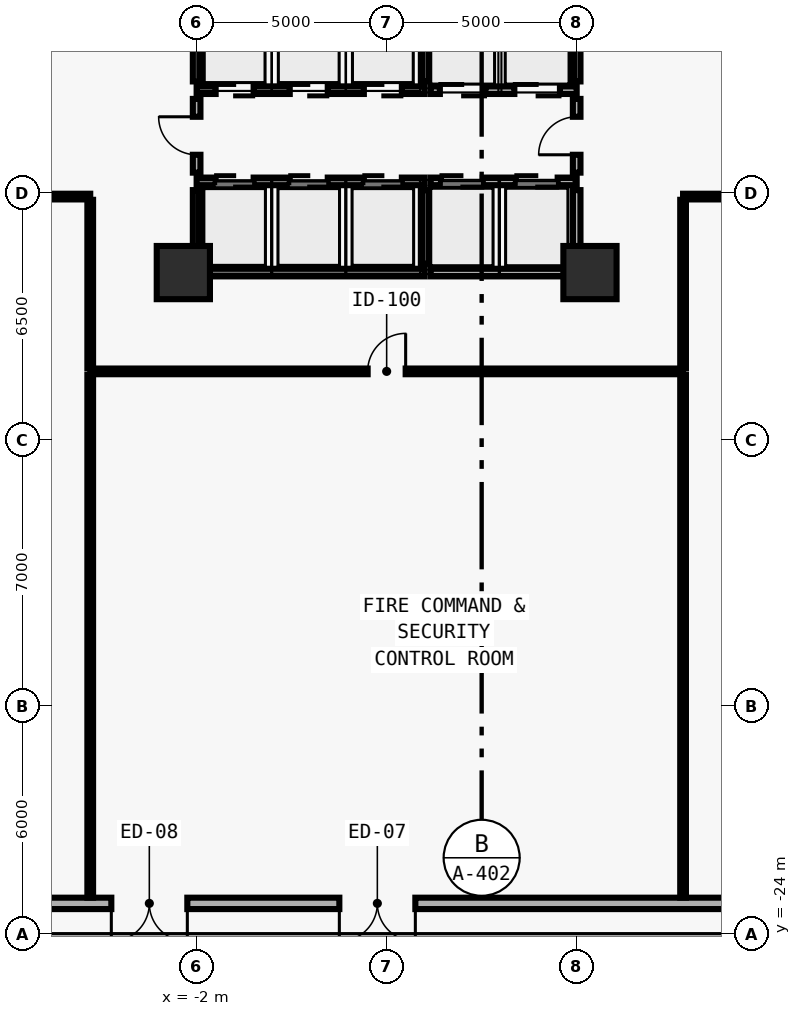
"""IFC4 building model, lengths in metres.
Left out: names, types, materials, properties, quantities, classifications, styles, units other than length and angle.
Written with IfcOpenShell. Run it as: python <this file> out.ifc"""

import sys

from ifc_helpers import new_model, si_unit, direction, frame, frame_2d, origin, origin_2d, place, context, subcontext, project, spatial, rectangle, extrude, element, fill, save


model = new_model("IFC4")
c1 = context("Model", 3, precision=1e-05, world=origin(), true_north=direction((0.0, 1.0)))
c2 = subcontext(c1, "Body", "Model", "MODEL_VIEW")
j1 = project(units=[si_unit("LENGTHUNIT", "METRE"), si_unit("PLANEANGLEUNIT", "RADIAN")], contexts=[c1])
p1 = place(None, origin())
s1 = spatial("IfcSite", under=j1, at=p1, CompositionType="ELEMENT")
p2 = place(p1, origin())
s2 = spatial("IfcBuilding", under=s1, at=p2, CompositionType="ELEMENT")
p3 = place(p2, origin())
s3 = spatial("IfcBuildingStorey", under=s2, at=p3, CompositionType="ELEMENT", Elevation=0.0)
for number, where, z_axis, x_axis in (
    (1, (-2.35, -6.6, 0.0), (0.0, 0.0, 1.0), (1.0, 0.0, 0.0)),
    (2, (8.35, -6.6, 0.0), (0.0, 0.0, 1.0), (1.0, 0.0, 0.0)),
):
    element("IfcColumn", number, at=place(p3, frame(where, z_axis=z_axis, x_axis=x_axis)), inside=s3, PredefinedType="COLUMN", context=c2, shape_type="SweptSolid", body=[
        extrude(rectangle(XDim=1.4, YDim=1.4, at=origin_2d()), origin(), (0.0, 0.0, 1.0), 4.575),
    ])
p4 = place(p3, frame((32.755, -23.2, 0.0), z_axis=(0.0, 0.0, 1.0), x_axis=(-1.0, 0.0, 0.0)))
e3 = element("IfcWall", 3, at=p4, inside=s3, PredefinedType="SOLIDWALL", context=c2, shape_type="SweptSolid", body=[
    extrude(rectangle(XDim=65.51, YDim=0.3, at=frame_2d((32.755, 0.0))), origin(), (0.0, 0.0, 1.0), 3.35),
])
p5 = place(p4, frame((29.0, 0.0, 0.0)))
e4 = element("IfcOpeningElement", 4, at=p5, cuts=e3, PredefinedType="OPENING", context=c2, shape_type="SweptSolid", body=[
    extrude(rectangle(XDim=2.0, YDim=2.4, at=frame_2d((1.0, 1.2))), frame((0.0, 0.16, 0.0), z_axis=(0.0, -1.0, 0.0), x_axis=(1.0, 0.0, 0.0)), (0.0, 0.0, 1.0), 0.32),
])
p6 = place(p4, frame((35.0, 0.0, 0.0)))
e5 = element("IfcOpeningElement", 5, at=p6, cuts=e3, PredefinedType="OPENING", context=c2, shape_type="SweptSolid", body=[
    extrude(rectangle(XDim=2.0, YDim=2.4, at=frame_2d((1.0, 1.2))), frame((0.0, 0.16, 0.0), z_axis=(0.0, -1.0, 0.0), x_axis=(1.0, 0.0, 0.0)), (0.0, 0.0, 1.0), 0.32),
])
p7 = place(p3, frame((-2.0, -1.8, 0.0), z_axis=(0.0, 0.0, 1.0), x_axis=(1.0, 0.0, 0.0)))
e6 = element("IfcWall", 6, at=p7, inside=s3, PredefinedType="SOLIDWALL", context=c2, shape_type="SweptSolid", body=[
    extrude(rectangle(XDim=6.0, YDim=0.2, at=frame_2d((3.0, 0.0))), origin(), (0.0, 0.0, 1.0), 4.28),
])
p8 = place(p7, frame((0.5, 0.0, 0.0)))
e7 = element("IfcOpeningElement", 7, at=p8, cuts=e6, PredefinedType="OPENING", context=c2, shape_type="SweptSolid", body=[
    extrude(rectangle(XDim=1.0, YDim=2.2, at=frame_2d((0.5, 1.1))), frame((0.0, 0.11, 0.0), z_axis=(0.0, -1.0, 0.0), x_axis=(1.0, 0.0, 0.0)), (0.0, 0.0, 1.0), 0.22),
])
p9 = place(p7, frame((2.45, 0.0, 0.0)))
e8 = element("IfcOpeningElement", 8, at=p9, cuts=e6, PredefinedType="OPENING", context=c2, shape_type="SweptSolid", body=[
    extrude(rectangle(XDim=1.0, YDim=2.2, at=frame_2d((0.5, 1.1))), frame((0.0, 0.11, 0.0), z_axis=(0.0, -1.0, 0.0), x_axis=(1.0, 0.0, 0.0)), (0.0, 0.0, 1.0), 0.22),
])
p10 = place(p7, frame((4.4, 0.0, 0.0)))
e9 = element("IfcOpeningElement", 9, at=p10, cuts=e6, PredefinedType="OPENING", context=c2, shape_type="SweptSolid", body=[
    extrude(rectangle(XDim=1.0, YDim=2.2, at=frame_2d((0.5, 1.1))), frame((0.0, 0.11, 0.0), z_axis=(0.0, -1.0, 0.0), x_axis=(1.0, 0.0, 0.0)), (0.0, 0.0, 1.0), 0.22),
])
p11 = place(p3, frame((-2.0, -1.57, 0.0), z_axis=(0.0, 0.0, 1.0), x_axis=(0.0, 1.0, 0.0)))
e10 = element("IfcWall", 10, at=p11, inside=s3, PredefinedType="SOLIDWALL", context=c2, shape_type="SweptSolid", body=[
    extrude(rectangle(XDim=2.05, YDim=0.2, at=frame_2d((1.025, 0.0))), origin(), (0.0, 0.0, 1.0), 3.362),
])
p12 = place(p3, frame((4.16, -1.8, 0.0), z_axis=(0.0, 0.0, 1.0), x_axis=(1.0, 0.0, 0.0)))
e11 = element("IfcWall", 11, at=p12, inside=s3, PredefinedType="SOLIDWALL", context=c2, shape_type="SweptSolid", body=[
    extrude(rectangle(XDim=3.84, YDim=0.2, at=frame_2d((1.92, 0.0))), origin(), (0.0, 0.0, 1.0), 4.28),
])
p13 = place(p12, frame((0.24, 0.0, 0.0)))
e12 = element("IfcOpeningElement", 12, at=p13, cuts=e11, PredefinedType="OPENING", context=c2, shape_type="SweptSolid", body=[
    extrude(rectangle(XDim=1.2, YDim=2.25, at=frame_2d((0.6, 1.125))), frame((0.0, 0.11, 0.0), z_axis=(0.0, -1.0, 0.0), x_axis=(1.0, 0.0, 0.0)), (0.0, 0.0, 1.0), 0.22),
])
p14 = place(p12, frame((2.2, 0.0, 0.0)))
e13 = element("IfcOpeningElement", 13, at=p14, cuts=e11, PredefinedType="OPENING", context=c2, shape_type="SweptSolid", body=[
    extrude(rectangle(XDim=1.2, YDim=2.25, at=frame_2d((0.6, 1.125))), frame((0.0, 0.11, 0.0), z_axis=(0.0, -1.0, 0.0), x_axis=(1.0, 0.0, 0.0)), (0.0, 0.0, 1.0), 0.22),
])
p15 = place(p3, frame((4.0, -1.57, 0.0), z_axis=(0.0, 0.0, 1.0), x_axis=(0.0, 1.0, 0.0)))
e14 = element("IfcWall", 14, at=p15, inside=s3, PredefinedType="SOLIDWALL", context=c2, shape_type="SweptSolid", body=[
    extrude(rectangle(XDim=1.94, YDim=0.2, at=frame_2d((0.97, 0.0))), origin(), (0.0, 0.0, 1.0), 4.28),
])
p16 = place(p3, frame((8.0, -1.57, 0.0), z_axis=(0.0, 0.0, 1.0), x_axis=(0.0, 1.0, 0.0)))
e15 = element("IfcWall", 15, at=p16, inside=s3, PredefinedType="SOLIDWALL", context=c2, shape_type="SweptSolid", body=[
    extrude(rectangle(XDim=2.05, YDim=0.2, at=frame_2d((1.025, 0.0))), origin(), (0.0, 0.0, 1.0), 3.362),
])
p17 = place(p3, frame((-2.0, -4.2, 0.0), z_axis=(0.0, 0.0, 1.0), x_axis=(1.0, 0.0, 0.0)))
e16 = element("IfcWall", 16, at=p17, inside=s3, PredefinedType="SOLIDWALL", context=c2, shape_type="SweptSolid", body=[
    extrude(rectangle(XDim=6.0, YDim=0.2, at=frame_2d((3.0, 0.0))), origin(), (0.0, 0.0, 1.0), 4.28),
])
p18 = place(p17, frame((0.5, 0.0, 0.0)))
e17 = element("IfcOpeningElement", 17, at=p18, cuts=e16, PredefinedType="OPENING", context=c2, shape_type="SweptSolid", body=[
    extrude(rectangle(XDim=1.0, YDim=2.2, at=frame_2d((0.5, 1.1))), frame((0.0, 0.11, 0.0), z_axis=(0.0, -1.0, 0.0), x_axis=(1.0, 0.0, 0.0)), (0.0, 0.0, 1.0), 0.22),
])
p19 = place(p17, frame((2.45, 0.0, 0.0)))
e18 = element("IfcOpeningElement", 18, at=p19, cuts=e16, PredefinedType="OPENING", context=c2, shape_type="SweptSolid", body=[
    extrude(rectangle(XDim=1.0, YDim=2.2, at=frame_2d((0.5, 1.1))), frame((0.0, 0.11, 0.0), z_axis=(0.0, -1.0, 0.0), x_axis=(1.0, 0.0, 0.0)), (0.0, 0.0, 1.0), 0.22),
])
p20 = place(p17, frame((4.4, 0.0, 0.0)))
e19 = element("IfcOpeningElement", 19, at=p20, cuts=e16, PredefinedType="OPENING", context=c2, shape_type="SweptSolid", body=[
    extrude(rectangle(XDim=1.0, YDim=2.2, at=frame_2d((0.5, 1.1))), frame((0.0, 0.11, 0.0), z_axis=(0.0, -1.0, 0.0), x_axis=(1.0, 0.0, 0.0)), (0.0, 0.0, 1.0), 0.22),
])
p21 = place(p3, frame((-2.0, -6.6, 0.0), z_axis=(0.0, 0.0, 1.0), x_axis=(1.0, 0.0, 0.0)))
e20 = element("IfcWall", 20, at=p21, inside=s3, PredefinedType="SOLIDWALL", context=c2, shape_type="SweptSolid", body=[
    extrude(rectangle(XDim=6.0, YDim=0.2, at=frame_2d((3.0, 0.0))), origin(), (0.0, 0.0, 1.0), 3.362),
])
p22 = place(p3, frame((-2.0, -6.37, 0.0), z_axis=(0.0, 0.0, 1.0), x_axis=(0.0, 1.0, 0.0)))
e21 = element("IfcWall", 21, at=p22, inside=s3, PredefinedType="SOLIDWALL", context=c2, shape_type="SweptSolid", body=[
    extrude(rectangle(XDim=1.94, YDim=0.2, at=frame_2d((0.97, 0.0))), origin(), (0.0, 0.0, 1.0), 3.362),
])
p23 = place(p3, frame((4.16, -4.2, 0.0), z_axis=(0.0, 0.0, 1.0), x_axis=(1.0, 0.0, 0.0)))
e22 = element("IfcWall", 22, at=p23, inside=s3, PredefinedType="SOLIDWALL", context=c2, shape_type="SweptSolid", body=[
    extrude(rectangle(XDim=3.84, YDim=0.2, at=frame_2d((1.92, 0.0))), origin(), (0.0, 0.0, 1.0), 4.28),
])
p24 = place(p23, frame((0.27, 0.0, 0.0)))
e23 = element("IfcOpeningElement", 23, at=p24, cuts=e22, PredefinedType="OPENING", context=c2, shape_type="SweptSolid", body=[
    extrude(rectangle(XDim=1.1, YDim=2.2, at=frame_2d((0.55, 1.1))), frame((0.0, 0.11, 0.0), z_axis=(0.0, -1.0, 0.0), x_axis=(1.0, 0.0, 0.0)), (0.0, 0.0, 1.0), 0.22),
])
p25 = place(p23, frame((2.24, 0.0, 0.0)))
e24 = element("IfcOpeningElement", 24, at=p25, cuts=e22, PredefinedType="OPENING", context=c2, shape_type="SweptSolid", body=[
    extrude(rectangle(XDim=1.1, YDim=2.2, at=frame_2d((0.55, 1.1))), frame((0.0, 0.11, 0.0), z_axis=(0.0, -1.0, 0.0), x_axis=(1.0, 0.0, 0.0)), (0.0, 0.0, 1.0), 0.22),
])
p26 = place(p3, frame((4.16, -6.6, 0.0), z_axis=(0.0, 0.0, 1.0), x_axis=(1.0, 0.0, 0.0)))
e25 = element("IfcWall", 25, at=p26, inside=s3, PredefinedType="SOLIDWALL", context=c2, shape_type="SweptSolid", body=[
    extrude(rectangle(XDim=3.84, YDim=0.2, at=frame_2d((1.92, 0.0))), origin(), (0.0, 0.0, 1.0), 3.362),
])
p27 = place(p3, frame((4.0, -6.37, 0.0), z_axis=(0.0, 0.0, 1.0), x_axis=(0.0, 1.0, 0.0)))
e26 = element("IfcWall", 26, at=p27, inside=s3, PredefinedType="SOLIDWALL", context=c2, shape_type="SweptSolid", body=[
    extrude(rectangle(XDim=1.94, YDim=0.2, at=frame_2d((0.97, 0.0))), origin(), (0.0, 0.0, 1.0), 4.28),
])
p28 = place(p3, frame((8.0, -6.37, 0.0), z_axis=(0.0, 0.0, 1.0), x_axis=(0.0, 1.0, 0.0)))
e27 = element("IfcWall", 27, at=p28, inside=s3, PredefinedType="SOLIDWALL", context=c2, shape_type="SweptSolid", body=[
    extrude(rectangle(XDim=1.94, YDim=0.2, at=frame_2d((0.97, 0.0))), origin(), (0.0, 0.0, 1.0), 3.362),
])
p29 = place(p3, frame((-2.0, -3.97, 0.0), z_axis=(0.0, 0.0, 1.0), x_axis=(0.0, 1.0, 0.0)))
e28 = element("IfcWall", 28, at=p29, inside=s3, PredefinedType="MOVABLE", context=c2, shape_type="SweptSolid", body=[
    extrude(rectangle(XDim=1.94, YDim=0.2, at=frame_2d((0.97, 0.0))), origin(), (0.0, 0.0, 1.0), 3.362),
])
p30 = place(p29, frame((0.47, 0.0, 0.0)))
e29 = element("IfcOpeningElement", 29, at=p30, cuts=e28, PredefinedType="OPENING", context=c2, shape_type="SweptSolid", body=[
    extrude(rectangle(XDim=1.0, YDim=2.1, at=frame_2d((0.5, 1.05))), frame((0.0, 0.11, 0.0), z_axis=(0.0, -1.0, 0.0), x_axis=(1.0, 0.0, 0.0)), (0.0, 0.0, 1.0), 0.22),
])
p31 = place(p3, frame((8.0, -3.97, 0.0), z_axis=(0.0, 0.0, 1.0), x_axis=(0.0, 1.0, 0.0)))
e30 = element("IfcWall", 30, at=p31, inside=s3, PredefinedType="MOVABLE", context=c2, shape_type="SweptSolid", body=[
    extrude(rectangle(XDim=1.94, YDim=0.2, at=frame_2d((0.97, 0.0))), origin(), (0.0, 0.0, 1.0), 3.362),
])
p32 = place(p31, frame((0.47, 0.0, 0.0)))
e31 = element("IfcOpeningElement", 31, at=p32, cuts=e30, PredefinedType="OPENING", context=c2, shape_type="SweptSolid", body=[
    extrude(rectangle(XDim=1.0, YDim=2.1, at=frame_2d((0.5, 1.05))), frame((0.0, 0.11, 0.0), z_axis=(0.0, -1.0, 0.0), x_axis=(1.0, 0.0, 0.0)), (0.0, 0.0, 1.0), 0.22),
])
p33 = place(p3, frame((-15.7, -4.6, 0.0), z_axis=(0.0, 0.0, 1.0), x_axis=(1.0, 0.0, 0.0)))
e32 = element("IfcWall", 32, at=p33, inside=s3, PredefinedType="PARTITIONING", context=c2, shape_type="SweptSolid", body=[
    extrude(rectangle(XDim=10.9, YDim=0.15, at=frame_2d((5.45, 0.0))), origin(), (0.0, 0.0, 1.0), 4.28),
])
p34 = place(p33, frame((4.95, 0.0, 0.0)))
e33 = element("IfcOpeningElement", 33, at=p34, cuts=e32, PredefinedType="OPENING", context=c2, shape_type="SweptSolid", body=[
    extrude(rectangle(XDim=1.0, YDim=2.1, at=frame_2d((0.5, 1.05))), frame((0.0, 0.085, 0.0), z_axis=(0.0, -1.0, 0.0), x_axis=(1.0, 0.0, 0.0)), (0.0, 0.0, 1.0), 0.17),
])
p35 = place(p3, frame((10.8, -4.6, 0.0), z_axis=(0.0, 0.0, 1.0), x_axis=(1.0, 0.0, 0.0)))
e34 = element("IfcWall", 34, at=p35, inside=s3, PredefinedType="PARTITIONING", context=c2, shape_type="SweptSolid", body=[
    extrude(rectangle(XDim=22.25, YDim=0.15, at=frame_2d((11.125, 0.0))), origin(), (0.0, 0.0, 1.0), 4.28),
])
p36 = place(p35, frame((10.625, 0.0, 0.0)))
e35 = element("IfcOpeningElement", 35, at=p36, cuts=e34, PredefinedType="OPENING", context=c2, shape_type="SweptSolid", body=[
    extrude(rectangle(XDim=1.0, YDim=2.1, at=frame_2d((0.5, 1.05))), frame((0.0, 0.085, 0.0), z_axis=(0.0, -1.0, 0.0), x_axis=(1.0, 0.0, 0.0)), (0.0, 0.0, 1.0), 0.17),
])
p37 = place(p3, frame((-4.8, -9.2, 0.0), z_axis=(0.0, 0.0, 1.0), x_axis=(1.0, 0.0, 0.0)))
e36 = element("IfcWall", 36, at=p37, inside=s3, PredefinedType="PARTITIONING", context=c2, shape_type="SweptSolid", body=[
    extrude(rectangle(XDim=15.6, YDim=0.15, at=frame_2d((7.8, 0.0))), origin(), (0.0, 0.0, 1.0), 4.28),
])
p38 = place(p37, frame((7.3, 0.0, 0.0)))
e37 = element("IfcOpeningElement", 37, at=p38, cuts=e36, PredefinedType="OPENING", context=c2, shape_type="SweptSolid", body=[
    extrude(rectangle(XDim=1.0, YDim=2.1, at=frame_2d((0.5, 1.05))), frame((0.0, 0.085, 0.0), z_axis=(0.0, -1.0, 0.0), x_axis=(1.0, 0.0, 0.0)), (0.0, 0.0, 1.0), 0.17),
])
for number, where, z_axis, x_axis in (
    (38, (-4.8, -4.685, 0.0), (0.0, 0.0, 1.0), (0.0, -1.0, 0.0)),
    (39, (10.8, -9.115, 0.0), (0.0, 0.0, 1.0), (0.0, 1.0, 0.0)),
):
    element("IfcWall", number, at=place(p3, frame(where, z_axis=z_axis, x_axis=x_axis)), inside=s3, PredefinedType="PARTITIONING", context=c2, shape_type="SweptSolid", body=[
        extrude(rectangle(XDim=4.43, YDim=0.15, at=frame_2d((2.215, 0.0))), origin(), (0.0, 0.0, 1.0), 4.28),
    ])
for number, where, z_axis, x_axis in (
    (40, (-4.8, -9.285, 0.0), (0.0, 0.0, 1.0), (0.0, -1.0, 0.0)),
    (41, (10.8, -23.05, 0.0), (0.0, 0.0, 1.0), (0.0, 1.0, 0.0)),
):
    element("IfcWall", number, at=place(p3, frame(where, z_axis=z_axis, x_axis=x_axis)), inside=s3, PredefinedType="PARTITIONING", context=c2, shape_type="SweptSolid", body=[
        extrude(rectangle(XDim=13.765, YDim=0.15, at=frame_2d((6.883, 0.0))), origin(), (0.0, 0.0, 1.0), 4.28),
    ])
p39 = place(p5, origin())
e42 = element("IfcDoor", 42, at=p39, inside=s3, OperationType="DOUBLE_DOOR_SINGLE_SWING", PredefinedType="DOOR", context=c2, shape_type="SweptSolid", body=[
    extrude(rectangle(XDim=2.0, YDim=2.4, at=frame_2d((1.0, 1.2))), frame((0.0, 0.025, 0.0), z_axis=(0.0, -1.0, 0.0), x_axis=(1.0, 0.0, 0.0)), (0.0, 0.0, 1.0), 0.05),
])
fill(e4, e42)
p40 = place(p6, origin())
e43 = element("IfcDoor", 43, at=p40, inside=s3, OperationType="DOUBLE_DOOR_SINGLE_SWING", PredefinedType="DOOR", context=c2, shape_type="SweptSolid", body=[
    extrude(rectangle(XDim=2.0, YDim=2.4, at=frame_2d((1.0, 1.2))), frame((0.0, 0.025, 0.0), z_axis=(0.0, -1.0, 0.0), x_axis=(1.0, 0.0, 0.0)), (0.0, 0.0, 1.0), 0.05),
])
fill(e5, e43)
p41 = place(p30, origin())
e44 = element("IfcDoor", 44, at=p41, inside=s3, OperationType="SINGLE_SWING_RIGHT", PredefinedType="DOOR", context=c2, shape_type="SweptSolid", body=[
    extrude(rectangle(XDim=1.0, YDim=2.1, at=frame_2d((0.5, 1.05))), frame((0.0, 0.025, 0.0), z_axis=(0.0, -1.0, 0.0), x_axis=(1.0, 0.0, 0.0)), (0.0, 0.0, 1.0), 0.05),
])
fill(e29, e44)
p42 = place(p32, origin())
e45 = element("IfcDoor", 45, at=p42, inside=s3, OperationType="SINGLE_SWING_LEFT", PredefinedType="DOOR", context=c2, shape_type="SweptSolid", body=[
    extrude(rectangle(XDim=1.0, YDim=2.1, at=frame_2d((0.5, 1.05))), frame((0.0, 0.025, 0.0), z_axis=(0.0, -1.0, 0.0), x_axis=(1.0, 0.0, 0.0)), (0.0, 0.0, 1.0), 0.05),
])
fill(e31, e45)
p43 = place(p38, origin())
e46 = element("IfcDoor", 46, at=p43, inside=s3, OperationType="SINGLE_SWING_RIGHT", PredefinedType="DOOR", context=c2, shape_type="SweptSolid", body=[
    extrude(rectangle(XDim=1.0, YDim=2.1, at=frame_2d((0.5, 1.05))), frame((0.0, 0.025, 0.0), z_axis=(0.0, -1.0, 0.0), x_axis=(1.0, 0.0, 0.0)), (0.0, 0.0, 1.0), 0.05),
])
fill(e37, e46)
p44 = place(p8, origin())
e47 = element("IfcDoor", 47, at=p44, inside=s3, OperationType="DOUBLE_DOOR_SLIDING", PredefinedType="DOOR", context=c2, shape_type="SweptSolid", body=[
    extrude(rectangle(XDim=1.0, YDim=2.2, at=frame_2d((0.5, 1.1))), frame((0.0, 0.025, 0.0), z_axis=(0.0, -1.0, 0.0), x_axis=(1.0, 0.0, 0.0)), (0.0, 0.0, 1.0), 0.05),
])
fill(e7, e47)
p45 = place(p9, origin())
e48 = element("IfcDoor", 48, at=p45, inside=s3, OperationType="DOUBLE_DOOR_SLIDING", PredefinedType="DOOR", context=c2, shape_type="SweptSolid", body=[
    extrude(rectangle(XDim=1.0, YDim=2.2, at=frame_2d((0.5, 1.1))), frame((0.0, 0.025, 0.0), z_axis=(0.0, -1.0, 0.0), x_axis=(1.0, 0.0, 0.0)), (0.0, 0.0, 1.0), 0.05),
])
fill(e8, e48)
p46 = place(p10, origin())
e49 = element("IfcDoor", 49, at=p46, inside=s3, OperationType="DOUBLE_DOOR_SLIDING", PredefinedType="DOOR", context=c2, shape_type="SweptSolid", body=[
    extrude(rectangle(XDim=1.0, YDim=2.2, at=frame_2d((0.5, 1.1))), frame((0.0, 0.025, 0.0), z_axis=(0.0, -1.0, 0.0), x_axis=(1.0, 0.0, 0.0)), (0.0, 0.0, 1.0), 0.05),
])
fill(e9, e49)
p47 = place(p13, origin())
e50 = element("IfcDoor", 50, at=p47, inside=s3, OperationType="DOUBLE_DOOR_SLIDING", PredefinedType="DOOR", context=c2, shape_type="SweptSolid", body=[
    extrude(rectangle(XDim=1.2, YDim=2.25, at=frame_2d((0.6, 1.125))), frame((0.0, 0.025, 0.0), z_axis=(0.0, -1.0, 0.0), x_axis=(1.0, 0.0, 0.0)), (0.0, 0.0, 1.0), 0.05),
])
fill(e12, e50)
p48 = place(p14, origin())
e51 = element("IfcDoor", 51, at=p48, inside=s3, OperationType="DOUBLE_DOOR_SLIDING", PredefinedType="DOOR", context=c2, shape_type="SweptSolid", body=[
    extrude(rectangle(XDim=1.2, YDim=2.25, at=frame_2d((0.6, 1.125))), frame((0.0, 0.025, 0.0), z_axis=(0.0, -1.0, 0.0), x_axis=(1.0, 0.0, 0.0)), (0.0, 0.0, 1.0), 0.05),
])
fill(e13, e51)
p49 = place(p18, origin())
e52 = element("IfcDoor", 52, at=p49, inside=s3, OperationType="DOUBLE_DOOR_SLIDING", PredefinedType="DOOR", context=c2, shape_type="SweptSolid", body=[
    extrude(rectangle(XDim=1.0, YDim=2.2, at=frame_2d((0.5, 1.1))), frame((0.0, 0.025, 0.0), z_axis=(0.0, -1.0, 0.0), x_axis=(1.0, 0.0, 0.0)), (0.0, 0.0, 1.0), 0.05),
])
fill(e17, e52)
p50 = place(p19, origin())
e53 = element("IfcDoor", 53, at=p50, inside=s3, OperationType="DOUBLE_DOOR_SLIDING", PredefinedType="DOOR", context=c2, shape_type="SweptSolid", body=[
    extrude(rectangle(XDim=1.0, YDim=2.2, at=frame_2d((0.5, 1.1))), frame((0.0, 0.025, 0.0), z_axis=(0.0, -1.0, 0.0), x_axis=(1.0, 0.0, 0.0)), (0.0, 0.0, 1.0), 0.05),
])
fill(e18, e53)
p51 = place(p20, origin())
e54 = element("IfcDoor", 54, at=p51, inside=s3, OperationType="DOUBLE_DOOR_SLIDING", PredefinedType="DOOR", context=c2, shape_type="SweptSolid", body=[
    extrude(rectangle(XDim=1.0, YDim=2.2, at=frame_2d((0.5, 1.1))), frame((0.0, 0.025, 0.0), z_axis=(0.0, -1.0, 0.0), x_axis=(1.0, 0.0, 0.0)), (0.0, 0.0, 1.0), 0.05),
])
fill(e19, e54)
p52 = place(p24, origin())
e55 = element("IfcDoor", 55, at=p52, inside=s3, OperationType="DOUBLE_DOOR_SLIDING", PredefinedType="DOOR", context=c2, shape_type="SweptSolid", body=[
    extrude(rectangle(XDim=1.1, YDim=2.2, at=frame_2d((0.55, 1.1))), frame((0.0, 0.025, 0.0), z_axis=(0.0, -1.0, 0.0), x_axis=(1.0, 0.0, 0.0)), (0.0, 0.0, 1.0), 0.05),
])
fill(e23, e55)
p53 = place(p25, origin())
e56 = element("IfcDoor", 56, at=p53, inside=s3, OperationType="DOUBLE_DOOR_SLIDING", PredefinedType="DOOR", context=c2, shape_type="SweptSolid", body=[
    extrude(rectangle(XDim=1.1, YDim=2.2, at=frame_2d((0.55, 1.1))), frame((0.0, 0.025, 0.0), z_axis=(0.0, -1.0, 0.0), x_axis=(1.0, 0.0, 0.0)), (0.0, 0.0, 1.0), 0.05),
])
fill(e24, e56)
save(model, sys.argv[1])
